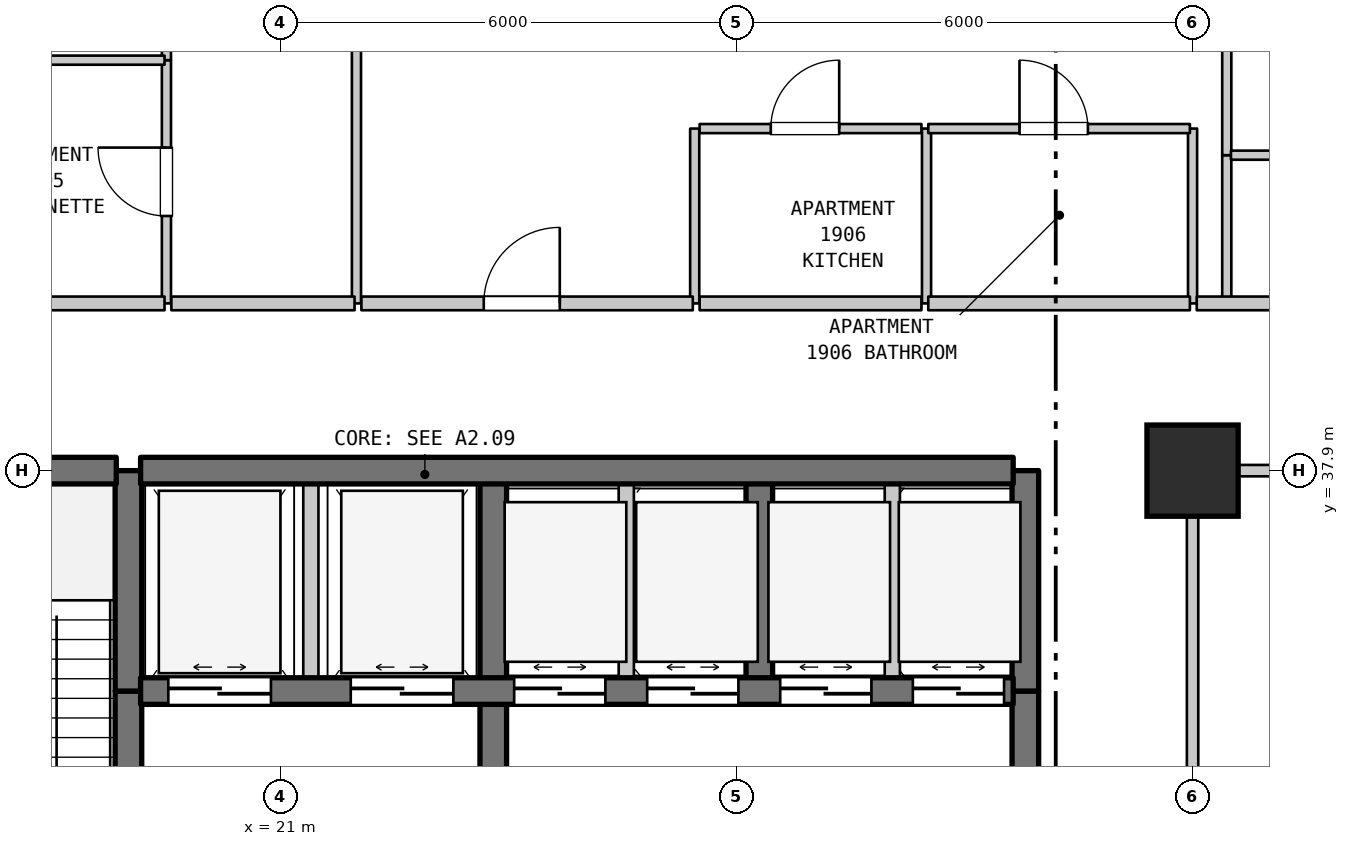
"""IFC4 building model, lengths in metres.
Left out: names, types, materials, properties, quantities, classifications, styles, units other than length and angle.
Written with IfcOpenShell. Run it as: python <this file> out.ifc"""

import sys

from ifc_helpers import new_model, si_unit, direction, frame, frame_2d, origin, origin_2d, place, context, subcontext, project, spatial, rectangle, extrude, element, fill, save


model = new_model("IFC4")
c1 = context("Model", 3, precision=1e-05, world=origin(), true_north=direction((0.0, 1.0)))
c2 = subcontext(c1, "Body", "Model", "MODEL_VIEW")
j1 = project(units=[si_unit("LENGTHUNIT", "METRE"), si_unit("PLANEANGLEUNIT", "RADIAN")], contexts=[c1])
p1 = place(None, origin())
s1 = spatial("IfcSite", under=j1, at=p1, CompositionType="ELEMENT")
p2 = place(p1, origin())
s2 = spatial("IfcBuilding", under=s1, at=p2, CompositionType="ELEMENT")
p3 = place(p2, frame((0.0, 0.0, 81.2)))
s3 = spatial("IfcBuildingStorey", under=s2, at=p3, CompositionType="ELEMENT", Elevation=81.2)
p4 = place(p3, frame((33.0, 37.9, 0.0), z_axis=(0.0, 0.0, 1.0), x_axis=(1.0, 0.0, 0.0)))
e1 = element("IfcColumn", 1, at=p4, inside=s3, PredefinedType="COLUMN", context=c2, shape_type="SweptSolid", body=[
    extrude(rectangle(XDim=1.2, YDim=1.2, at=origin_2d()), origin(), (0.0, 0.0, 1.0), 5.2),
])
p5 = place(p3, frame((19.0, 29.5, 0.0), z_axis=(0.0, 0.0, 1.0), x_axis=(0.0, 1.0, 0.0)))
e2 = element("IfcWall", 2, at=p5, inside=s3, PredefinedType="SHEAR", context=c2, shape_type="SweptSolid", body=[
    extrude(rectangle(XDim=5.5, YDim=0.35, at=frame_2d((2.75, 0.0))), origin(), (0.0, 0.0, 1.0), 4.885),
])
p6 = place(p5, frame((2.025, 0.0, 0.0)))
e3 = element("IfcOpeningElement", 3, at=p6, cuts=e2, PredefinedType="OPENING", context=c2, shape_type="SweptSolid", body=[
    extrude(rectangle(XDim=1.1, YDim=2.15, at=frame_2d((0.55, 1.075))), frame((0.0, 0.185, 0.0), z_axis=(0.0, -1.0, 0.0), x_axis=(1.0, 0.0, 0.0)), (0.0, 0.0, 1.0), 0.37),
])
p7 = place(p3, frame((19.0, 35.0, 0.0), z_axis=(0.0, 0.0, 1.0), x_axis=(0.0, 1.0, 0.0)))
e4 = element("IfcWall", 4, at=p7, inside=s3, PredefinedType="SHEAR", context=c2, shape_type="SweptSolid", body=[
    extrude(rectangle(XDim=2.9, YDim=0.35, at=frame_2d((1.45, 0.0))), origin(), (0.0, 0.0, 1.0), 4.885),
])
p8 = place(p3, frame((19.5, 40.1, 0.0), z_axis=(0.0, 0.0, 1.0), x_axis=(0.0, 1.0, 0.0)))
e5 = element("IfcWall", 5, at=p8, inside=s3, PredefinedType="PARTITIONING", context=c2, shape_type="SweptSolid", body=[
    extrude(rectangle(XDim=3.2, YDim=0.12, at=frame_2d((1.6, 0.0))), origin(), (0.0, 0.0, 1.0), 4.885),
])
p9 = place(p8, frame((1.15, 0.0, 0.0)))
e6 = element("IfcOpeningElement", 6, at=p9, cuts=e5, PredefinedType="OPENING", context=c2, shape_type="SweptSolid", body=[
    extrude(rectangle(XDim=0.9, YDim=2.15, at=frame_2d((0.45, 1.075))), frame((0.0, 0.07, 0.0), z_axis=(0.0, -1.0, 0.0), x_axis=(1.0, 0.0, 0.0)), (0.0, 0.0, 1.0), 0.14),
])
p10 = place(p3, frame((19.5, 43.3, 0.0), z_axis=(0.0, 0.0, 1.0), x_axis=(0.0, 1.0, 0.0)))
e7 = element("IfcWall", 7, at=p10, inside=s3, PredefinedType="PARTITIONING", context=c2, shape_type="SweptSolid", body=[
    extrude(rectangle(XDim=2.9, YDim=0.12, at=frame_2d((1.45, 0.0))), origin(), (0.0, 0.0, 1.0), 4.885),
])
p11 = place(p3, frame((21.4, 35.0, 0.0), z_axis=(0.0, 0.0, 1.0), x_axis=(0.0, 1.0, 0.0)))
e8 = element("IfcWall", 8, at=p11, inside=s3, PredefinedType="STANDARD", context=c2, shape_type="SweptSolid", body=[
    extrude(rectangle(XDim=2.9, YDim=0.2, at=frame_2d((1.45, 0.0))), origin(), (0.0, 0.0, 1.0), 4.885),
])
p12 = place(p3, frame((22.0, 40.1, 0.0), z_axis=(0.0, 0.0, 1.0), x_axis=(0.0, 1.0, 0.0)))
e9 = element("IfcWall", 9, at=p12, inside=s3, PredefinedType="PARTITIONING", context=c2, shape_type="SweptSolid", body=[
    extrude(rectangle(XDim=13.79, YDim=0.12, at=frame_2d((6.895, 0.0))), origin(), (0.0, 0.0, 1.0), 4.885),
])
p13 = place(p3, frame((23.8, 31.5, 0.0), z_axis=(0.0, 0.0, 1.0), x_axis=(0.0, 1.0, 0.0)))
e10 = element("IfcWall", 10, at=p13, inside=s3, PredefinedType="SHEAR", context=c2, shape_type="SweptSolid", body=[
    extrude(rectangle(XDim=3.5, YDim=0.35, at=frame_2d((1.75, 0.0))), origin(), (0.0, 0.0, 1.0), 4.885),
])
p14 = place(p13, frame((1.127, 0.0, 0.0)))
e11 = element("IfcOpeningElement", 11, at=p14, cuts=e10, PredefinedType="OPENING", context=c2, shape_type="SweptSolid", body=[
    extrude(rectangle(XDim=1.1, YDim=2.15, at=frame_2d((0.55, 1.075))), frame((0.0, 0.185, 0.0), z_axis=(0.0, -1.0, 0.0), x_axis=(1.0, 0.0, 0.0)), (0.0, 0.0, 1.0), 0.37),
])
p15 = place(p3, frame((23.8, 35.0, 0.0), z_axis=(0.0, 0.0, 1.0), x_axis=(0.0, 1.0, 0.0)))
e12 = element("IfcWall", 12, at=p15, inside=s3, PredefinedType="SHEAR", context=c2, shape_type="SweptSolid", body=[
    extrude(rectangle(XDim=2.9, YDim=0.35, at=frame_2d((1.45, 0.0))), origin(), (0.0, 0.0, 1.0), 4.885),
])
p16 = place(p3, frame((25.55, 35.0, 0.0), z_axis=(0.0, 0.0, 1.0), x_axis=(0.0, 1.0, 0.0)))
e13 = element("IfcWall", 13, at=p16, inside=s3, PredefinedType="STANDARD", context=c2, shape_type="SweptSolid", body=[
    extrude(rectangle(XDim=2.9, YDim=0.2, at=frame_2d((1.45, 0.0))), origin(), (0.0, 0.0, 1.0), 4.885),
])
p17 = place(p3, frame((26.45, 40.1, 0.0), z_axis=(0.0, 0.0, 1.0), x_axis=(0.0, 1.0, 0.0)))
e14 = element("IfcWall", 14, at=p17, inside=s3, PredefinedType="PARTITIONING", context=c2, shape_type="SweptSolid", body=[
    extrude(rectangle(XDim=2.3, YDim=0.12, at=frame_2d((1.15, 0.0))), origin(), (0.0, 0.0, 1.0), 4.885),
])
p18 = place(p3, frame((27.3, 35.0, 0.0), z_axis=(0.0, 0.0, 1.0), x_axis=(0.0, 1.0, 0.0)))
e15 = element("IfcWall", 15, at=p18, inside=s3, PredefinedType="SHEAR", context=c2, shape_type="SweptSolid", body=[
    extrude(rectangle(XDim=2.9, YDim=0.35, at=frame_2d((1.45, 0.0))), origin(), (0.0, 0.0, 1.0), 4.885),
])
p19 = place(p3, frame((29.05, 35.0, 0.0), z_axis=(0.0, 0.0, 1.0), x_axis=(0.0, 1.0, 0.0)))
e16 = element("IfcWall", 16, at=p19, inside=s3, PredefinedType="STANDARD", context=c2, shape_type="SweptSolid", body=[
    extrude(rectangle(XDim=2.9, YDim=0.2, at=frame_2d((1.45, 0.0))), origin(), (0.0, 0.0, 1.0), 4.885),
])
p20 = place(p3, frame((29.5, 40.1, 0.0), z_axis=(0.0, 0.0, 1.0), x_axis=(0.0, 1.0, 0.0)))
e17 = element("IfcWall", 17, at=p20, inside=s3, PredefinedType="PARTITIONING", context=c2, shape_type="SweptSolid", body=[
    extrude(rectangle(XDim=2.3, YDim=0.12, at=frame_2d((1.15, 0.0))), origin(), (0.0, 0.0, 1.0), 4.885),
])
p21 = place(p3, frame((30.8, 31.5, 0.0), z_axis=(0.0, 0.0, 1.0), x_axis=(0.0, 1.0, 0.0)))
e18 = element("IfcWall", 18, at=p21, inside=s3, PredefinedType="SHEAR", context=c2, shape_type="SweptSolid", body=[
    extrude(rectangle(XDim=3.5, YDim=0.35, at=frame_2d((1.75, 0.0))), origin(), (0.0, 0.0, 1.0), 4.885),
])
p22 = place(p21, frame((1.15, 0.0, 0.0)))
e19 = element("IfcOpeningElement", 19, at=p22, cuts=e18, PredefinedType="OPENING", context=c2, shape_type="SweptSolid", body=[
    extrude(rectangle(XDim=1.2, YDim=2.2, at=frame_2d((0.6, 1.1))), frame((0.0, 0.185, 0.0), z_axis=(0.0, -1.0, 0.0), x_axis=(1.0, 0.0, 0.0)), (0.0, 0.0, 1.0), 0.37),
])
p23 = place(p3, frame((30.8, 35.0, 0.0), z_axis=(0.0, 0.0, 1.0), x_axis=(0.0, 1.0, 0.0)))
e20 = element("IfcWall", 20, at=p23, inside=s3, PredefinedType="SHEAR", context=c2, shape_type="SweptSolid", body=[
    extrude(rectangle(XDim=2.9, YDim=0.35, at=frame_2d((1.45, 0.0))), origin(), (0.0, 0.0, 1.0), 4.885),
])
p24 = place(p3, frame((33.0, 27.91, 0.0), z_axis=(0.0, 0.0, 1.0), x_axis=(0.0, 1.0, 0.0)))
e21 = element("IfcWall", 21, at=p24, inside=s3, PredefinedType="STANDARD", context=c2, shape_type="SweptSolid", body=[
    extrude(rectangle(XDim=9.98, YDim=0.15, at=frame_2d((4.99, 0.0))), origin(), (0.0, 0.0, 1.0), 4.385),
])
p25 = place(p3, frame((33.0, 40.1, 0.0), z_axis=(0.0, 0.0, 1.0), x_axis=(0.0, 1.0, 0.0)))
e22 = element("IfcWall", 22, at=p25, inside=s3, PredefinedType="PARTITIONING", context=c2, shape_type="SweptSolid", body=[
    extrude(rectangle(XDim=2.3, YDim=0.12, at=frame_2d((1.15, 0.0))), origin(), (0.0, 0.0, 1.0), 4.285),
])
p26 = place(p3, frame((33.45, 40.1, 0.0), z_axis=(0.0, 0.0, 1.0), x_axis=(0.0, 1.0, 0.0)))
e23 = element("IfcWall", 23, at=p26, inside=s3, PredefinedType="PARTITIONING", context=c2, shape_type="SweptSolid", body=[
    extrude(rectangle(XDim=1.95, YDim=0.12, at=frame_2d((0.975, 0.0))), origin(), (0.0, 0.0, 1.0), 4.885),
])
p27 = place(p3, frame((33.45, 42.05, 0.0), z_axis=(0.0, 0.0, 1.0), x_axis=(0.0, 1.0, 0.0)))
e24 = element("IfcWall", 24, at=p27, inside=s3, PredefinedType="PARTITIONING", context=c2, shape_type="SweptSolid", body=[
    extrude(rectangle(XDim=3.4, YDim=0.12, at=frame_2d((1.7, 0.0))), origin(), (0.0, 0.0, 1.0), 4.885),
])
p28 = place(p3, frame((19.16, 35.0, 0.0), z_axis=(0.0, 0.0, 1.0), x_axis=(1.0, 0.0, 0.0)))
e25 = element("IfcWall", 25, at=p28, inside=s3, PredefinedType="SHEAR", context=c2, shape_type="SweptSolid", body=[
    extrude(rectangle(XDim=11.48, YDim=0.35, at=frame_2d((5.74, 0.0))), origin(), (0.0, 0.0, 1.0), 4.885),
])
p29 = place(p28, frame((0.365, 0.0, 0.0)))
e26 = element("IfcOpeningElement", 26, at=p29, cuts=e25, PredefinedType="OPENING", context=c2, shape_type="SweptSolid", body=[
    extrude(rectangle(XDim=1.35, YDim=2.2, at=frame_2d((0.675, 1.1))), frame((0.0, 0.185, 0.0), z_axis=(0.0, -1.0, 0.0), x_axis=(1.0, 0.0, 0.0)), (0.0, 0.0, 1.0), 0.37),
])
p30 = place(p28, frame((2.765, 0.0, 0.0)))
e27 = element("IfcOpeningElement", 27, at=p30, cuts=e25, PredefinedType="OPENING", context=c2, shape_type="SweptSolid", body=[
    extrude(rectangle(XDim=1.35, YDim=2.2, at=frame_2d((0.675, 1.1))), frame((0.0, 0.185, 0.0), z_axis=(0.0, -1.0, 0.0), x_axis=(1.0, 0.0, 0.0)), (0.0, 0.0, 1.0), 0.37),
])
p31 = place(p28, frame((4.915, 0.0, 0.0)))
e28 = element("IfcOpeningElement", 28, at=p31, cuts=e25, PredefinedType="OPENING", context=c2, shape_type="SweptSolid", body=[
    extrude(rectangle(XDim=1.2, YDim=2.2, at=frame_2d((0.6, 1.1))), frame((0.0, 0.185, 0.0), z_axis=(0.0, -1.0, 0.0), x_axis=(1.0, 0.0, 0.0)), (0.0, 0.0, 1.0), 0.37),
])
p32 = place(p28, frame((6.665, 0.0, 0.0)))
e29 = element("IfcOpeningElement", 29, at=p32, cuts=e25, PredefinedType="OPENING", context=c2, shape_type="SweptSolid", body=[
    extrude(rectangle(XDim=1.2, YDim=2.2, at=frame_2d((0.6, 1.1))), frame((0.0, 0.185, 0.0), z_axis=(0.0, -1.0, 0.0), x_axis=(1.0, 0.0, 0.0)), (0.0, 0.0, 1.0), 0.37),
])
p33 = place(p28, frame((8.415, 0.0, 0.0)))
e30 = element("IfcOpeningElement", 30, at=p33, cuts=e25, PredefinedType="OPENING", context=c2, shape_type="SweptSolid", body=[
    extrude(rectangle(XDim=1.2, YDim=2.2, at=frame_2d((0.6, 1.1))), frame((0.0, 0.185, 0.0), z_axis=(0.0, -1.0, 0.0), x_axis=(1.0, 0.0, 0.0)), (0.0, 0.0, 1.0), 0.37),
])
p34 = place(p28, frame((10.16, 0.0, 0.0)))
e31 = element("IfcOpeningElement", 31, at=p34, cuts=e25, PredefinedType="OPENING", context=c2, shape_type="SweptSolid", body=[
    extrude(rectangle(XDim=1.2, YDim=2.2, at=frame_2d((0.6, 1.1))), frame((0.0, 0.185, 0.0), z_axis=(0.0, -1.0, 0.0), x_axis=(1.0, 0.0, 0.0)), (0.0, 0.0, 1.0), 0.37),
])
p35 = place(p3, frame((15.16, 37.9, 0.0), z_axis=(0.0, 0.0, 1.0), x_axis=(1.0, 0.0, 0.0)))
e32 = element("IfcWall", 32, at=p35, inside=s3, PredefinedType="SHEAR", context=c2, shape_type="SweptSolid", body=[
    extrude(rectangle(XDim=3.68, YDim=0.35, at=frame_2d((1.84, 0.0))), origin(), (0.0, 0.0, 1.0), 4.885),
])
p36 = place(p3, frame((19.16, 37.9, 0.0), z_axis=(0.0, 0.0, 1.0), x_axis=(1.0, 0.0, 0.0)))
e33 = element("IfcWall", 33, at=p36, inside=s3, PredefinedType="SHEAR", context=c2, shape_type="SweptSolid", body=[
    extrude(rectangle(XDim=11.48, YDim=0.35, at=frame_2d((5.74, 0.0))), origin(), (0.0, 0.0, 1.0), 4.885),
])
p37 = place(p3, frame((33.07, 37.9, 0.0), z_axis=(0.0, 0.0, 1.0), x_axis=(1.0, 0.0, 0.0)))
e34 = element("IfcWall", 34, at=p37, inside=s3, PredefinedType="STANDARD", context=c2, shape_type="SweptSolid", body=[
    extrude(rectangle(XDim=25.985, YDim=0.15, at=frame_2d((12.992, 0.0))), origin(), (0.0, 0.0, 1.0), 4.885),
])
p38 = place(p3, frame((16.865, 40.1, 0.0), z_axis=(0.0, 0.0, 1.0), x_axis=(1.0, 0.0, 0.0)))
e35 = element("IfcWall", 35, at=p38, inside=s3, PredefinedType="STANDARD", context=c2, shape_type="SweptSolid", body=[
    extrude(rectangle(XDim=2.61, YDim=0.18, at=frame_2d((1.305, 0.0))), origin(), (0.0, 0.0, 1.0), 4.885),
])
p39 = place(p3, frame((19.565, 40.1, 0.0), z_axis=(0.0, 0.0, 1.0), x_axis=(1.0, 0.0, 0.0)))
e36 = element("IfcWall", 36, at=p39, inside=s3, PredefinedType="STANDARD", context=c2, shape_type="SweptSolid", body=[
    extrude(rectangle(XDim=2.41, YDim=0.18, at=frame_2d((1.205, 0.0))), origin(), (0.0, 0.0, 1.0), 4.885),
])
p40 = place(p3, frame((22.065, 40.1, 0.0), z_axis=(0.0, 0.0, 1.0), x_axis=(1.0, 0.0, 0.0)))
e37 = element("IfcWall", 37, at=p40, inside=s3, PredefinedType="STANDARD", context=c2, shape_type="SweptSolid", body=[
    extrude(rectangle(XDim=4.36, YDim=0.18, at=frame_2d((2.18, 0.0))), origin(), (0.0, 0.0, 1.0), 4.885),
])
p41 = place(p40, frame((1.61, 0.0, 0.0)))
e38 = element("IfcOpeningElement", 38, at=p41, cuts=e37, PredefinedType="OPENING", context=c2, shape_type="SweptSolid", body=[
    extrude(rectangle(XDim=1.0, YDim=2.15, at=frame_2d((0.5, 1.075))), frame((0.0, 0.1, 0.0), z_axis=(0.0, -1.0, 0.0), x_axis=(1.0, 0.0, 0.0)), (0.0, 0.0, 1.0), 0.2),
])
p42 = place(p3, frame((26.515, 40.1, 0.0), z_axis=(0.0, 0.0, 1.0), x_axis=(1.0, 0.0, 0.0)))
e39 = element("IfcWall", 39, at=p42, inside=s3, PredefinedType="STANDARD", context=c2, shape_type="SweptSolid", body=[
    extrude(rectangle(XDim=2.918, YDim=0.18, at=frame_2d((1.459, 0.0))), origin(), (0.0, 0.0, 1.0), 4.885),
])
p43 = place(p3, frame((29.523, 40.1, 0.0), z_axis=(0.0, 0.0, 1.0), x_axis=(1.0, 0.0, 0.0)))
e40 = element("IfcWall", 40, at=p43, inside=s3, PredefinedType="STANDARD", context=c2, shape_type="SweptSolid", body=[
    extrude(rectangle(XDim=3.442, YDim=0.18, at=frame_2d((1.721, 0.0))), origin(), (0.0, 0.0, 1.0), 4.885),
])
p44 = place(p3, frame((33.055, 40.1, 0.0), z_axis=(0.0, 0.0, 1.0), x_axis=(1.0, 0.0, 0.0)))
e41 = element("IfcWall", 41, at=p44, inside=s3, PredefinedType="STANDARD", context=c2, shape_type="SweptSolid", body=[
    extrude(rectangle(XDim=5.445, YDim=0.18, at=frame_2d((2.723, 0.0))), origin(), (0.0, 0.0, 1.0), 4.885),
])
p45 = place(p44, frame((2.455, 0.0, 0.0)))
e42 = element("IfcOpeningElement", 42, at=p45, cuts=e41, PredefinedType="OPENING", context=c2, shape_type="SweptSolid", body=[
    extrude(rectangle(XDim=1.0, YDim=2.15, at=frame_2d((0.5, 1.075))), frame((0.0, 0.1, 0.0), z_axis=(0.0, -1.0, 0.0), x_axis=(1.0, 0.0, 0.0)), (0.0, 0.0, 1.0), 0.2),
])
p46 = place(p3, frame((33.505, 42.05, 0.0), z_axis=(0.0, 0.0, 1.0), x_axis=(1.0, 0.0, 0.0)))
e43 = element("IfcWall", 43, at=p46, inside=s3, PredefinedType="PARTITIONING", context=c2, shape_type="SweptSolid", body=[
    extrude(rectangle(XDim=2.16, YDim=0.12, at=frame_2d((1.08, 0.0))), origin(), (0.0, 0.0, 1.0), 4.885),
])
p47 = place(p46, frame((0.553, 0.0, 0.0)))
e44 = element("IfcOpeningElement", 44, at=p47, cuts=e43, PredefinedType="OPENING", context=c2, shape_type="SweptSolid", body=[
    extrude(rectangle(XDim=0.9, YDim=2.15, at=frame_2d((0.45, 1.075))), frame((0.0, 0.07, 0.0), z_axis=(0.0, -1.0, 0.0), x_axis=(1.0, 0.0, 0.0)), (0.0, 0.0, 1.0), 0.14),
])
p48 = place(p3, frame((26.515, 42.4, 0.0), z_axis=(0.0, 0.0, 1.0), x_axis=(1.0, 0.0, 0.0)))
e45 = element("IfcWall", 45, at=p48, inside=s3, PredefinedType="PARTITIONING", context=c2, shape_type="SweptSolid", body=[
    extrude(rectangle(XDim=2.918, YDim=0.12, at=frame_2d((1.459, 0.0))), origin(), (0.0, 0.0, 1.0), 4.885),
])
p49 = place(p48, frame((0.936, 0.0, 0.0)))
e46 = element("IfcOpeningElement", 46, at=p49, cuts=e45, PredefinedType="OPENING", context=c2, shape_type="SweptSolid", body=[
    extrude(rectangle(XDim=0.9, YDim=2.15, at=frame_2d((0.45, 1.075))), frame((0.0, 0.07, 0.0), z_axis=(0.0, -1.0, 0.0), x_axis=(1.0, 0.0, 0.0)), (0.0, 0.0, 1.0), 0.14),
])
p50 = place(p3, frame((29.523, 42.4, 0.0), z_axis=(0.0, 0.0, 1.0), x_axis=(1.0, 0.0, 0.0)))
e47 = element("IfcWall", 47, at=p50, inside=s3, PredefinedType="PARTITIONING", context=c2, shape_type="SweptSolid", body=[
    extrude(rectangle(XDim=3.442, YDim=0.12, at=frame_2d((1.721, 0.0))), origin(), (0.0, 0.0, 1.0), 4.885),
])
p51 = place(p50, frame((1.2, 0.0, 0.0)))
e48 = element("IfcOpeningElement", 48, at=p51, cuts=e47, PredefinedType="OPENING", context=c2, shape_type="SweptSolid", body=[
    extrude(rectangle(XDim=0.9, YDim=2.1, at=frame_2d((0.45, 1.05))), frame((0.0, 0.07, 0.0), z_axis=(0.0, -1.0, 0.0), x_axis=(1.0, 0.0, 0.0)), (0.0, 0.0, 1.0), 0.14),
])
p52 = place(p3, frame((16.865, 43.3, 0.0), z_axis=(0.0, 0.0, 1.0), x_axis=(1.0, 0.0, 0.0)))
e49 = element("IfcWall", 49, at=p52, inside=s3, PredefinedType="PARTITIONING", context=c2, shape_type="SweptSolid", body=[
    extrude(rectangle(XDim=2.61, YDim=0.12, at=frame_2d((1.305, 0.0))), origin(), (0.0, 0.0, 1.0), 4.885),
])
p53 = place(p9, origin())
e50 = element("IfcDoor", 50, at=p53, inside=s3, OperationType="SINGLE_SWING_RIGHT", PredefinedType="DOOR", context=c2, shape_type="SweptSolid", body=[
    extrude(rectangle(XDim=0.9, YDim=2.15, at=frame_2d((0.45, 1.075))), frame((0.0, 0.025, 0.0), z_axis=(0.0, -1.0, 0.0), x_axis=(1.0, 0.0, 0.0)), (0.0, 0.0, 1.0), 0.05),
])
fill(e6, e50)
p54 = place(p29, origin())
e51 = element("IfcDoor", 51, at=p54, inside=s3, OperationType="DOUBLE_DOOR_SLIDING", PredefinedType="DOOR", context=c2, shape_type="SweptSolid", body=[
    extrude(rectangle(XDim=1.35, YDim=2.2, at=frame_2d((0.675, 1.1))), frame((0.0, 0.025, 0.0), z_axis=(0.0, -1.0, 0.0), x_axis=(1.0, 0.0, 0.0)), (0.0, 0.0, 1.0), 0.05),
])
fill(e26, e51)
p55 = place(p30, origin())
e52 = element("IfcDoor", 52, at=p55, inside=s3, OperationType="DOUBLE_DOOR_SLIDING", PredefinedType="DOOR", context=c2, shape_type="SweptSolid", body=[
    extrude(rectangle(XDim=1.35, YDim=2.2, at=frame_2d((0.675, 1.1))), frame((0.0, 0.025, 0.0), z_axis=(0.0, -1.0, 0.0), x_axis=(1.0, 0.0, 0.0)), (0.0, 0.0, 1.0), 0.05),
])
fill(e27, e52)
p56 = place(p31, origin())
e53 = element("IfcDoor", 53, at=p56, inside=s3, OperationType="DOUBLE_DOOR_SLIDING", PredefinedType="DOOR", context=c2, shape_type="SweptSolid", body=[
    extrude(rectangle(XDim=1.2, YDim=2.2, at=frame_2d((0.6, 1.1))), frame((0.0, 0.025, 0.0), z_axis=(0.0, -1.0, 0.0), x_axis=(1.0, 0.0, 0.0)), (0.0, 0.0, 1.0), 0.05),
])
fill(e28, e53)
p57 = place(p32, origin())
e54 = element("IfcDoor", 54, at=p57, inside=s3, OperationType="DOUBLE_DOOR_SLIDING", PredefinedType="DOOR", context=c2, shape_type="SweptSolid", body=[
    extrude(rectangle(XDim=1.2, YDim=2.2, at=frame_2d((0.6, 1.1))), frame((0.0, 0.025, 0.0), z_axis=(0.0, -1.0, 0.0), x_axis=(1.0, 0.0, 0.0)), (0.0, 0.0, 1.0), 0.05),
])
fill(e29, e54)
p58 = place(p33, origin())
e55 = element("IfcDoor", 55, at=p58, inside=s3, OperationType="DOUBLE_DOOR_SLIDING", PredefinedType="DOOR", context=c2, shape_type="SweptSolid", body=[
    extrude(rectangle(XDim=1.2, YDim=2.2, at=frame_2d((0.6, 1.1))), frame((0.0, 0.025, 0.0), z_axis=(0.0, -1.0, 0.0), x_axis=(1.0, 0.0, 0.0)), (0.0, 0.0, 1.0), 0.05),
])
fill(e30, e55)
p59 = place(p34, origin())
e56 = element("IfcDoor", 56, at=p59, inside=s3, OperationType="DOUBLE_DOOR_SLIDING", PredefinedType="DOOR", context=c2, shape_type="SweptSolid", body=[
    extrude(rectangle(XDim=1.2, YDim=2.2, at=frame_2d((0.6, 1.1))), frame((0.0, 0.025, 0.0), z_axis=(0.0, -1.0, 0.0), x_axis=(1.0, 0.0, 0.0)), (0.0, 0.0, 1.0), 0.05),
])
fill(e31, e56)
p60 = place(p41, origin())
e57 = element("IfcDoor", 57, at=p60, inside=s3, OperationType="SINGLE_SWING_RIGHT", PredefinedType="DOOR", context=c2, shape_type="SweptSolid", body=[
    extrude(rectangle(XDim=1.0, YDim=2.15, at=frame_2d((0.5, 1.075))), frame((0.0, 0.025, 0.0), z_axis=(0.0, -1.0, 0.0), x_axis=(1.0, 0.0, 0.0)), (0.0, 0.0, 1.0), 0.05),
])
fill(e38, e57)
p61 = place(p49, origin())
e58 = element("IfcDoor", 58, at=p61, inside=s3, OperationType="SINGLE_SWING_RIGHT", PredefinedType="DOOR", context=c2, shape_type="SweptSolid", body=[
    extrude(rectangle(XDim=0.9, YDim=2.15, at=frame_2d((0.45, 1.075))), frame((0.0, 0.025, 0.0), z_axis=(0.0, -1.0, 0.0), x_axis=(1.0, 0.0, 0.0)), (0.0, 0.0, 1.0), 0.05),
])
fill(e46, e58)
p62 = place(p51, origin())
e59 = element("IfcDoor", 59, at=p62, inside=s3, OperationType="SINGLE_SWING_LEFT", PredefinedType="DOOR", context=c2, shape_type="SweptSolid", body=[
    extrude(rectangle(XDim=0.9, YDim=2.1, at=frame_2d((0.45, 1.05))), frame((0.0, 0.025, 0.0), z_axis=(0.0, -1.0, 0.0), x_axis=(1.0, 0.0, 0.0)), (0.0, 0.0, 1.0), 0.05),
])
fill(e48, e59)
save(model, sys.argv[1])
